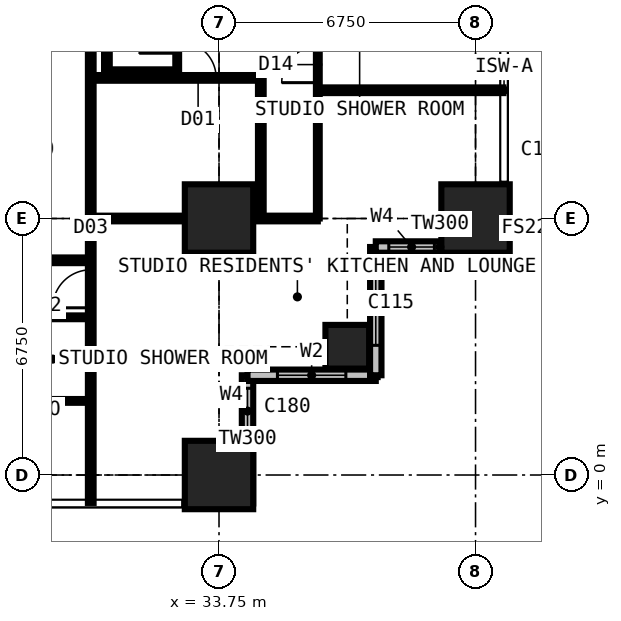
"""IFC4 building model, lengths in metres.
Left out: names, types, materials, properties, quantities, classifications, styles, units other than length and angle.
Written with IfcOpenShell. Run it as: python <this file> out.ifc"""

import sys

from ifc_helpers import new_model, si_unit, direction, frame, frame_2d, origin, origin_2d, place, context, subcontext, project, spatial, rectangle, extrude, element, fill, save


model = new_model("IFC4")
c1 = context("Model", 3, precision=1e-05, world=origin(), true_north=direction((0.0, 1.0)))
c2 = subcontext(c1, "Body", "Model", "MODEL_VIEW")
j1 = project(units=[si_unit("LENGTHUNIT", "METRE"), si_unit("PLANEANGLEUNIT", "RADIAN")], contexts=[c1])
p1 = place(None, origin())
s1 = spatial("IfcSite", under=j1, at=p1, CompositionType="ELEMENT")
p2 = place(p1, origin())
s2 = spatial("IfcBuilding", under=s1, at=p2, CompositionType="ELEMENT")
p3 = place(p2, frame((0.0, 0.0, 61.2)))
s3 = spatial("IfcBuildingStorey", under=s2, at=p3, CompositionType="ELEMENT", Elevation=61.2)
for number, where, z_axis, x_axis in (
    (1, (33.75, 0.0, 0.0), (0.0, 0.0, 1.0), (1.0, 0.0, 0.0)),
    (2, (33.75, 6.75, 0.0), (0.0, 0.0, 1.0), (1.0, 0.0, 0.0)),
):
    element("IfcColumn", number, at=place(p3, frame(where, z_axis=z_axis, x_axis=x_axis)), inside=s3, PredefinedType="COLUMN", context=c2, shape_type="SweptSolid", body=[
        extrude(rectangle(XDim=1.8, YDim=1.8, at=origin_2d()), origin(), (0.0, 0.0, 1.0), 3.6),
    ])
p4 = place(p3, frame((37.125, 3.375, 0.0), z_axis=(0.0, 0.0, 1.0), x_axis=(1.0, 0.0, 0.0)))
e3 = element("IfcColumn", 3, at=p4, inside=s3, PredefinedType="COLUMN", context=c2, shape_type="SweptSolid", body=[
    extrude(rectangle(XDim=1.15, YDim=1.15, at=origin_2d()), origin(), (0.0, 0.0, 1.0), 3.6),
])
p5 = place(p3, frame((40.5, 6.75, 0.0), z_axis=(0.0, 0.0, 1.0), x_axis=(1.0, 0.0, 0.0)))
e4 = element("IfcColumn", 4, at=p5, inside=s3, PredefinedType="COLUMN", context=c2, shape_type="SweptSolid", body=[
    extrude(rectangle(XDim=1.8, YDim=1.8, at=origin_2d()), origin(), (0.0, 0.0, 1.0), 3.6),
])
p6 = place(p3, frame((34.5, -0.75, 0.0), z_axis=(0.0, 0.0, 1.0), x_axis=(0.0, 1.0, 0.0)))
e5 = element("IfcWall", 5, at=p6, inside=s3, PredefinedType="SOLIDWALL", context=c2, shape_type="SweptSolid", body=[
    extrude(rectangle(XDim=3.375, YDim=0.3, at=frame_2d((1.688, 0.0))), origin(), (0.0, 0.0, 1.0), 3.375),
])
p7 = place(p6, frame((1.833, 0.0, 0.9)))
e6 = element("IfcOpeningElement", 6, at=p7, cuts=e5, PredefinedType="OPENING", context=c2, shape_type="SweptSolid", body=[
    extrude(rectangle(XDim=1.2, YDim=1.8, at=frame_2d((0.6, 0.9))), frame((0.0, 0.16, 0.0), z_axis=(0.0, -1.0, 0.0), x_axis=(1.0, 0.0, 0.0)), (0.0, 0.0, 1.0), 0.32),
])
p8 = place(p3, frame((34.5, 2.625, 0.0), z_axis=(0.0, 0.0, 1.0), x_axis=(1.0, 0.0, 0.0)))
e7 = element("IfcWall", 7, at=p8, inside=s3, PredefinedType="SOLIDWALL", context=c2, shape_type="SweptSolid", body=[
    extrude(rectangle(XDim=3.375, YDim=0.3, at=frame_2d((1.688, 0.0))), origin(), (0.0, 0.0, 1.0), 3.375),
])
p9 = place(p8, frame((0.788, 0.0, 0.6)))
e8 = element("IfcOpeningElement", 8, at=p9, cuts=e7, PredefinedType="OPENING", context=c2, shape_type="SweptSolid", body=[
    extrude(rectangle(XDim=1.8, YDim=2.1, at=frame_2d((0.9, 1.05))), frame((0.0, 0.16, 0.0), z_axis=(0.0, -1.0, 0.0), x_axis=(1.0, 0.0, 0.0)), (0.0, 0.0, 1.0), 0.32),
])
p10 = place(p3, frame((37.875, 2.625, 0.0), z_axis=(0.0, 0.0, 1.0), x_axis=(0.0, 1.0, 0.0)))
e9 = element("IfcWall", 9, at=p10, inside=s3, PredefinedType="SOLIDWALL", context=c2, shape_type="SweptSolid", body=[
    extrude(rectangle(XDim=3.375, YDim=0.3, at=frame_2d((1.688, 0.0))), origin(), (0.0, 0.0, 1.0), 3.375),
])
p11 = place(p10, frame((0.788, 0.0, 0.6)))
e10 = element("IfcOpeningElement", 10, at=p11, cuts=e9, PredefinedType="OPENING", context=c2, shape_type="SweptSolid", body=[
    extrude(rectangle(XDim=1.8, YDim=2.1, at=frame_2d((0.9, 1.05))), frame((0.0, 0.16, 0.0), z_axis=(0.0, -1.0, 0.0), x_axis=(1.0, 0.0, 0.0)), (0.0, 0.0, 1.0), 0.32),
])
p12 = place(p3, frame((37.875, 6.0, 0.0), z_axis=(0.0, 0.0, 1.0), x_axis=(1.0, 0.0, 0.0)))
e11 = element("IfcWall", 11, at=p12, inside=s3, PredefinedType="SOLIDWALL", context=c2, shape_type="SweptSolid", body=[
    extrude(rectangle(XDim=3.375, YDim=0.3, at=frame_2d((1.688, 0.0))), origin(), (0.0, 0.0, 1.0), 3.375),
])
p13 = place(p12, frame((0.343, 0.0, 0.9)))
e12 = element("IfcOpeningElement", 12, at=p13, cuts=e11, PredefinedType="OPENING", context=c2, shape_type="SweptSolid", body=[
    extrude(rectangle(XDim=1.2, YDim=1.8, at=frame_2d((0.6, 0.9))), frame((0.0, 0.16, 0.0), z_axis=(0.0, -1.0, 0.0), x_axis=(1.0, 0.0, 0.0)), (0.0, 0.0, 1.0), 0.32),
])
p14 = place(p3, frame((6.75, 4.15, 0.0), z_axis=(0.0, 0.0, 1.0), x_axis=(1.0, 0.0, 0.0)))
e13 = element("IfcWall", 13, at=p14, inside=s3, PredefinedType="PARTITIONING", context=c2, shape_type="SweptSolid", body=[
    extrude(rectangle(XDim=23.625, YDim=0.1, at=frame_2d((11.812, 0.0))), origin(), (0.0, 0.0, 1.0), 3.375),
])
p15 = place(p14, frame((0.2, 0.0, 0.0)))
e14 = element("IfcOpeningElement", 14, at=p15, cuts=e13, PredefinedType="OPENING", context=c2, shape_type="SweptSolid", body=[
    extrude(rectangle(XDim=0.95, YDim=2.2, at=frame_2d((0.475, 1.1))), frame((0.0, 0.06, 0.0), z_axis=(0.0, -1.0, 0.0), x_axis=(1.0, 0.0, 0.0)), (0.0, 0.0, 1.0), 0.12),
])
p16 = place(p14, frame((3.625, 0.0, 0.0)))
e15 = element("IfcOpeningElement", 15, at=p16, cuts=e13, PredefinedType="OPENING", context=c2, shape_type="SweptSolid", body=[
    extrude(rectangle(XDim=0.95, YDim=2.2, at=frame_2d((0.475, 1.1))), frame((0.0, 0.06, 0.0), z_axis=(0.0, -1.0, 0.0), x_axis=(1.0, 0.0, 0.0)), (0.0, 0.0, 1.0), 0.12),
])
p17 = place(p14, frame((7.0, 0.0, 0.0)))
e16 = element("IfcOpeningElement", 16, at=p17, cuts=e13, PredefinedType="OPENING", context=c2, shape_type="SweptSolid", body=[
    extrude(rectangle(XDim=0.95, YDim=2.2, at=frame_2d((0.475, 1.1))), frame((0.0, 0.06, 0.0), z_axis=(0.0, -1.0, 0.0), x_axis=(1.0, 0.0, 0.0)), (0.0, 0.0, 1.0), 0.12),
])
p18 = place(p14, frame((10.325, 0.0, 0.0)))
e17 = element("IfcOpeningElement", 17, at=p18, cuts=e13, PredefinedType="OPENING", context=c2, shape_type="SweptSolid", body=[
    extrude(rectangle(XDim=0.95, YDim=2.2, at=frame_2d((0.475, 1.1))), frame((0.0, 0.06, 0.0), z_axis=(0.0, -1.0, 0.0), x_axis=(1.0, 0.0, 0.0)), (0.0, 0.0, 1.0), 0.12),
])
p19 = place(p14, frame((13.75, 0.0, 0.0)))
e18 = element("IfcOpeningElement", 18, at=p19, cuts=e13, PredefinedType="OPENING", context=c2, shape_type="SweptSolid", body=[
    extrude(rectangle(XDim=0.95, YDim=2.2, at=frame_2d((0.475, 1.1))), frame((0.0, 0.06, 0.0), z_axis=(0.0, -1.0, 0.0), x_axis=(1.0, 0.0, 0.0)), (0.0, 0.0, 1.0), 0.12),
])
p20 = place(p14, frame((17.125, 0.0, 0.0)))
e19 = element("IfcOpeningElement", 19, at=p20, cuts=e13, PredefinedType="OPENING", context=c2, shape_type="SweptSolid", body=[
    extrude(rectangle(XDim=0.95, YDim=2.2, at=frame_2d((0.475, 1.1))), frame((0.0, 0.06, 0.0), z_axis=(0.0, -1.0, 0.0), x_axis=(1.0, 0.0, 0.0)), (0.0, 0.0, 1.0), 0.12),
])
p21 = place(p14, frame((20.5, 0.0, 0.0)))
e20 = element("IfcOpeningElement", 20, at=p21, cuts=e13, PredefinedType="OPENING", context=c2, shape_type="SweptSolid", body=[
    extrude(rectangle(XDim=0.95, YDim=2.2, at=frame_2d((0.475, 1.1))), frame((0.0, 0.06, 0.0), z_axis=(0.0, -1.0, 0.0), x_axis=(1.0, 0.0, 0.0)), (0.0, 0.0, 1.0), 0.12),
])
p22 = place(p3, frame((22.988, 5.65, 0.0), z_axis=(0.0, 0.0, 1.0), x_axis=(1.0, 0.0, 0.0)))
e21 = element("IfcWall", 21, at=p22, inside=s3, PredefinedType="PARTITIONING", context=c2, shape_type="SweptSolid", body=[
    extrude(rectangle(XDim=7.387, YDim=0.15, at=frame_2d((3.694, 0.0))), origin(), (0.0, 0.0, 1.0), 3.375),
])
p23 = place(p22, frame((2.15, 0.0, 0.0)))
e22 = element("IfcOpeningElement", 22, at=p23, cuts=e21, PredefinedType="OPENING", context=c2, shape_type="SweptSolid", body=[
    extrude(rectangle(XDim=0.95, YDim=2.2, at=frame_2d((0.475, 1.1))), frame((0.0, 0.085, 0.0), z_axis=(0.0, -1.0, 0.0), x_axis=(1.0, 0.0, 0.0)), (0.0, 0.0, 1.0), 0.17),
])
p24 = place(p3, frame((28.375, 1.95, 0.0), z_axis=(0.0, 0.0, 1.0), x_axis=(1.0, 0.0, 0.0)))
e23 = element("IfcWall", 23, at=p24, inside=s3, PredefinedType="PARTITIONING", context=c2, shape_type="SweptSolid", body=[
    extrude(rectangle(XDim=2.0, YDim=0.1, at=frame_2d((1.0, 0.0))), origin(), (0.0, 0.0, 1.0), 3.375),
])
p25 = place(p3, frame((30.375, -0.734, 0.0), z_axis=(0.0, 0.0, 1.0), x_axis=(0.0, 1.0, 0.0)))
e24 = element("IfcWall", 24, at=p25, inside=s3, PredefinedType="PARTITIONING", context=c2, shape_type="SweptSolid", body=[
    extrude(rectangle(XDim=12.034, YDim=0.15, at=frame_2d((6.017, 0.0))), origin(), (0.0, 0.0, 1.0), 3.375),
])
p26 = place(p25, frame((5.134, 0.0, 0.0)))
e25 = element("IfcOpeningElement", 25, at=p26, cuts=e24, PredefinedType="OPENING", context=c2, shape_type="SweptSolid", body=[
    extrude(rectangle(XDim=1.0, YDim=2.2, at=frame_2d((0.5, 1.1))), frame((0.0, 0.085, 0.0), z_axis=(0.0, -1.0, 0.0), x_axis=(1.0, 0.0, 0.0)), (0.0, 0.0, 1.0), 0.17),
])
p27 = place(p3, frame((30.375, 6.75, 0.0), z_axis=(0.0, 0.0, 1.0), x_axis=(1.0, 0.0, 0.0)))
e26 = element("IfcWall", 26, at=p27, inside=s3, PredefinedType="PARTITIONING", context=c2, shape_type="SweptSolid", body=[
    extrude(rectangle(XDim=5.975, YDim=0.15, at=frame_2d((2.988, 0.0))), origin(), (0.0, 0.0, 1.0), 2.877),
])
p28 = place(p3, frame((30.375, 10.45, 0.0), z_axis=(0.0, 0.0, 1.0), x_axis=(1.0, 0.0, 0.0)))
e27 = element("IfcWall", 27, at=p28, inside=s3, PredefinedType="PARTITIONING", context=c2, shape_type="SweptSolid", body=[
    extrude(rectangle(XDim=4.475, YDim=0.15, at=frame_2d((2.238, 0.0))), origin(), (0.0, 0.0, 1.0), 3.375),
])
p29 = place(p28, frame((2.35, 0.0, 0.0)))
e28 = element("IfcOpeningElement", 28, at=p29, cuts=e27, PredefinedType="OPENING", context=c2, shape_type="SweptSolid", body=[
    extrude(rectangle(XDim=0.95, YDim=2.2, at=frame_2d((0.475, 1.1))), frame((0.0, 0.085, 0.0), z_axis=(0.0, -1.0, 0.0), x_axis=(1.0, 0.0, 0.0)), (0.0, 0.0, 1.0), 0.17),
])
p30 = place(p3, frame((30.8, 10.6, 0.0), z_axis=(0.0, 0.0, 1.0), x_axis=(0.0, 1.0, 0.0)))
e29 = element("IfcWall", 29, at=p30, inside=s3, PredefinedType="PARTITIONING", context=c2, shape_type="SweptSolid", body=[
    extrude(rectangle(XDim=0.7, YDim=0.15, at=frame_2d((0.35, 0.0))), origin(), (0.0, 0.0, 1.0), 3.375),
])
p31 = place(p3, frame((30.8, 10.6, 0.0), z_axis=(0.0, 0.0, 1.0), x_axis=(1.0, 0.0, 0.0)))
e30 = element("IfcWall", 30, at=p31, inside=s3, PredefinedType="PARTITIONING", context=c2, shape_type="SweptSolid", body=[
    extrude(rectangle(XDim=1.85, YDim=0.15, at=frame_2d((0.925, 0.0))), origin(), (0.0, 0.0, 1.0), 3.375),
])
p32 = place(p3, frame((32.65, 10.6, 0.0), z_axis=(0.0, 0.0, 1.0), x_axis=(0.0, 1.0, 0.0)))
e31 = element("IfcWall", 31, at=p32, inside=s3, PredefinedType="SHEAR", context=c2, shape_type="SweptSolid", body=[
    extrude(rectangle(XDim=9.3, YDim=0.1, at=frame_2d((4.65, 0.0))), origin(), (0.0, 0.0, 1.0), 3.375),
])
p33 = place(p32, frame((0.5, 0.0, 0.0)))
e32 = element("IfcOpeningElement", 32, at=p33, cuts=e31, PredefinedType="OPENING", context=c2, shape_type="SweptSolid", body=[
    extrude(rectangle(XDim=1.0, YDim=2.2, at=frame_2d((0.5, 1.1))), frame((0.0, 0.06, 0.0), z_axis=(0.0, -1.0, 0.0), x_axis=(1.0, 0.0, 0.0)), (0.0, 0.0, 1.0), 0.12),
])
p34 = place(p3, frame((34.85, 6.75, 0.0), z_axis=(0.0, 0.0, 1.0), x_axis=(0.0, 1.0, 0.0)))
e33 = element("IfcWall", 33, at=p34, inside=s3, PredefinedType="PARTITIONING", context=c2, shape_type="SweptSolid", body=[
    extrude(rectangle(XDim=3.7, YDim=0.15, at=frame_2d((1.85, 0.0))), origin(), (0.0, 0.0, 1.0), 3.375),
])
p35 = place(p3, frame((36.35, 6.75, 0.0), z_axis=(0.0, 0.0, 1.0), x_axis=(0.0, 1.0, 0.0)))
e34 = element("IfcWall", 34, at=p35, inside=s3, PredefinedType="PARTITIONING", context=c2, shape_type="SweptSolid", body=[
    extrude(rectangle(XDim=23.625, YDim=0.1, at=frame_2d((11.812, 0.0))), origin(), (0.0, 0.0, 1.0), 3.375),
])
p36 = place(p35, frame((3.575, 0.0, 0.0)))
e35 = element("IfcOpeningElement", 35, at=p36, cuts=e34, PredefinedType="OPENING", context=c2, shape_type="SweptSolid", body=[
    extrude(rectangle(XDim=0.95, YDim=2.2, at=frame_2d((0.475, 1.1))), frame((0.0, 0.06, 0.0), z_axis=(0.0, -1.0, 0.0), x_axis=(1.0, 0.0, 0.0)), (0.0, 0.0, 1.0), 0.12),
])
p37 = place(p35, frame((7.0, 0.0, 0.0)))
e36 = element("IfcOpeningElement", 36, at=p37, cuts=e34, PredefinedType="OPENING", context=c2, shape_type="SweptSolid", body=[
    extrude(rectangle(XDim=0.95, YDim=2.2, at=frame_2d((0.475, 1.1))), frame((0.0, 0.06, 0.0), z_axis=(0.0, -1.0, 0.0), x_axis=(1.0, 0.0, 0.0)), (0.0, 0.0, 1.0), 0.12),
])
p38 = place(p35, frame((10.375, 0.0, 0.0)))
e37 = element("IfcOpeningElement", 37, at=p38, cuts=e34, PredefinedType="OPENING", context=c2, shape_type="SweptSolid", body=[
    extrude(rectangle(XDim=0.95, YDim=2.2, at=frame_2d((0.475, 1.1))), frame((0.0, 0.06, 0.0), z_axis=(0.0, -1.0, 0.0), x_axis=(1.0, 0.0, 0.0)), (0.0, 0.0, 1.0), 0.12),
])
p39 = place(p35, frame((13.75, 0.0, 0.0)))
e38 = element("IfcOpeningElement", 38, at=p39, cuts=e34, PredefinedType="OPENING", context=c2, shape_type="SweptSolid", body=[
    extrude(rectangle(XDim=0.95, YDim=2.2, at=frame_2d((0.475, 1.1))), frame((0.0, 0.06, 0.0), z_axis=(0.0, -1.0, 0.0), x_axis=(1.0, 0.0, 0.0)), (0.0, 0.0, 1.0), 0.12),
])
p40 = place(p35, frame((17.125, 0.0, 0.0)))
e39 = element("IfcOpeningElement", 39, at=p40, cuts=e34, PredefinedType="OPENING", context=c2, shape_type="SweptSolid", body=[
    extrude(rectangle(XDim=0.95, YDim=2.2, at=frame_2d((0.475, 1.1))), frame((0.0, 0.06, 0.0), z_axis=(0.0, -1.0, 0.0), x_axis=(1.0, 0.0, 0.0)), (0.0, 0.0, 1.0), 0.12),
])
p41 = place(p35, frame((20.5, 0.0, 0.0)))
e40 = element("IfcOpeningElement", 40, at=p41, cuts=e34, PredefinedType="OPENING", context=c2, shape_type="SweptSolid", body=[
    extrude(rectangle(XDim=0.95, YDim=2.2, at=frame_2d((0.475, 1.1))), frame((0.0, 0.06, 0.0), z_axis=(0.0, -1.0, 0.0), x_axis=(1.0, 0.0, 0.0)), (0.0, 0.0, 1.0), 0.12),
])
p42 = place(p3, frame((36.35, 10.125, 0.0), z_axis=(0.0, 0.0, 1.0), x_axis=(1.0, 0.0, 0.0)))
e41 = element("IfcWall", 41, at=p42, inside=s3, PredefinedType="PARTITIONING", context=c2, shape_type="SweptSolid", body=[
    extrude(rectangle(XDim=4.884, YDim=0.15, at=frame_2d((2.442, 0.0))), origin(), (0.0, 0.0, 1.0), 3.375),
])
p43 = place(p7, origin())
e42 = element("IfcWindow", 42, at=p43, inside=s3, PartitioningType="SINGLE_PANEL", PredefinedType="WINDOW", context=c2, shape_type="SweptSolid", body=[
    extrude(rectangle(XDim=1.2, YDim=1.8, at=frame_2d((0.6, 0.9))), frame((0.0, 0.03, 0.0), z_axis=(0.0, -1.0, 0.0), x_axis=(1.0, 0.0, 0.0)), (0.0, 0.0, 1.0), 0.06),
])
fill(e6, e42)
p44 = place(p9, origin())
e43 = element("IfcWindow", 43, at=p44, inside=s3, PartitioningType="SINGLE_PANEL", PredefinedType="WINDOW", context=c2, shape_type="SweptSolid", body=[
    extrude(rectangle(XDim=1.8, YDim=2.1, at=frame_2d((0.9, 1.05))), frame((0.0, 0.03, 0.0), z_axis=(0.0, -1.0, 0.0), x_axis=(1.0, 0.0, 0.0)), (0.0, 0.0, 1.0), 0.06),
])
fill(e8, e43)
p45 = place(p11, origin())
e44 = element("IfcWindow", 44, at=p45, inside=s3, PartitioningType="SINGLE_PANEL", PredefinedType="WINDOW", context=c2, shape_type="SweptSolid", body=[
    extrude(rectangle(XDim=1.8, YDim=2.1, at=frame_2d((0.9, 1.05))), frame((0.0, 0.03, 0.0), z_axis=(0.0, -1.0, 0.0), x_axis=(1.0, 0.0, 0.0)), (0.0, 0.0, 1.0), 0.06),
])
fill(e10, e44)
p46 = place(p13, origin())
e45 = element("IfcWindow", 45, at=p46, inside=s3, PartitioningType="SINGLE_PANEL", PredefinedType="WINDOW", context=c2, shape_type="SweptSolid", body=[
    extrude(rectangle(XDim=1.2, YDim=1.8, at=frame_2d((0.6, 0.9))), frame((0.0, 0.03, 0.0), z_axis=(0.0, -1.0, 0.0), x_axis=(1.0, 0.0, 0.0)), (0.0, 0.0, 1.0), 0.06),
])
fill(e12, e45)
p47 = place(p26, origin())
e46 = element("IfcDoor", 46, at=p47, inside=s3, OperationType="SINGLE_SWING_LEFT", PredefinedType="DOOR", context=c2, shape_type="SweptSolid", body=[
    extrude(rectangle(XDim=1.0, YDim=2.2, at=frame_2d((0.5, 1.1))), frame((0.0, 0.025, 0.0), z_axis=(0.0, -1.0, 0.0), x_axis=(1.0, 0.0, 0.0)), (0.0, 0.0, 1.0), 0.05),
])
fill(e25, e46)
p48 = place(p36, origin())
e47 = element("IfcDoor", 47, at=p48, inside=s3, OperationType="SINGLE_SWING_LEFT", PredefinedType="DOOR", context=c2, shape_type="SweptSolid", body=[
    extrude(rectangle(XDim=0.95, YDim=2.2, at=frame_2d((0.475, 1.1))), frame((0.0, 0.025, 0.0), z_axis=(0.0, -1.0, 0.0), x_axis=(1.0, 0.0, 0.0)), (0.0, 0.0, 1.0), 0.05),
])
fill(e35, e47)
p49 = place(p33, origin())
e48 = element("IfcDoor", 48, at=p49, inside=s3, OperationType="SINGLE_SWING_LEFT", PredefinedType="DOOR", context=c2, shape_type="SweptSolid", body=[
    extrude(rectangle(XDim=1.0, YDim=2.2, at=frame_2d((0.5, 1.1))), frame((0.0, 0.025, 0.0), z_axis=(0.0, -1.0, 0.0), x_axis=(1.0, 0.0, 0.0)), (0.0, 0.0, 1.0), 0.05),
])
fill(e32, e48)
p50 = place(p29, origin())
e49 = element("IfcDoor", 49, at=p50, inside=s3, OperationType="SINGLE_SWING_LEFT", PredefinedType="DOOR", context=c2, shape_type="SweptSolid", body=[
    extrude(rectangle(XDim=0.95, YDim=2.2, at=frame_2d((0.475, 1.1))), frame((0.0, 0.025, 0.0), z_axis=(0.0, -1.0, 0.0), x_axis=(1.0, 0.0, 0.0)), (0.0, 0.0, 1.0), 0.05),
])
fill(e28, e49)
save(model, sys.argv[1])
